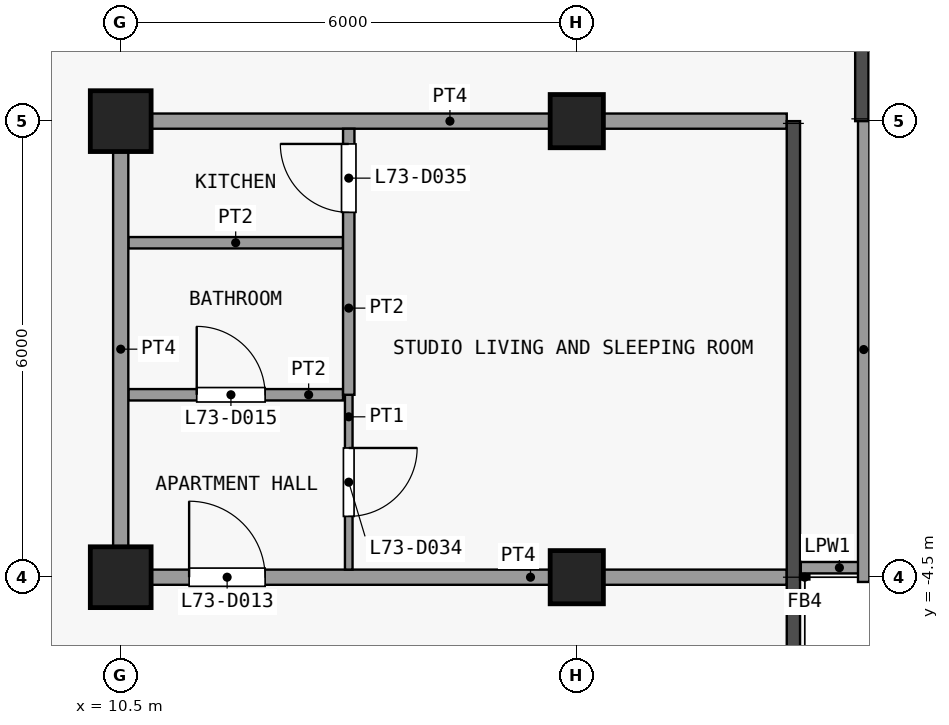
"""IFC4 building model, lengths in metres.
Left out: names, types, materials, properties, quantities, classifications, styles, units other than length and angle.
Written with IfcOpenShell. Run it as: python <this file> out.ifc"""

import sys

from ifc_helpers import new_model, si_unit, direction, frame, frame_2d, origin, origin_2d, place, context, subcontext, project, spatial, rectangle, extrude, element, fill, save


model = new_model("IFC4")
c1 = context("Model", 3, precision=1e-05, world=origin(), true_north=direction((0.0, 1.0)))
c2 = subcontext(c1, "Body", "Model", "MODEL_VIEW")
j1 = project(units=[si_unit("LENGTHUNIT", "METRE"), si_unit("PLANEANGLEUNIT", "RADIAN")], contexts=[c1])
p1 = place(None, origin())
s1 = spatial("IfcSite", under=j1, at=p1, CompositionType="ELEMENT")
p2 = place(p1, origin())
s2 = spatial("IfcBuilding", under=s1, at=p2, CompositionType="ELEMENT")
p3 = place(p2, frame((0.0, 0.0, 287.9)))
s3 = spatial("IfcBuildingStorey", under=s2, at=p3, CompositionType="ELEMENT", Elevation=287.9)
for number, where, z_axis, x_axis in (
    (1, (10.5, -4.5, 0.0), (0.0, 0.0, 1.0), (1.0, 0.0, 0.0)),
    (2, (10.5, 1.5, 0.0), (0.0, 0.0, 1.0), (1.0, 0.0, 0.0)),
):
    element("IfcColumn", number, at=place(p3, frame(where, z_axis=z_axis, x_axis=x_axis)), inside=s3, PredefinedType="COLUMN", context=c2, shape_type="SweptSolid", body=[
        extrude(rectangle(XDim=0.8, YDim=0.8, at=origin_2d()), origin(), (0.0, 0.0, 1.0), 3.6),
    ])
for number, where, z_axis, x_axis in (
    (3, (16.5, -4.5, 0.0), (0.0, 0.0, 1.0), (1.0, 0.0, 0.0)),
    (4, (16.5, 1.5, 0.0), (0.0, 0.0, 1.0), (1.0, 0.0, 0.0)),
):
    element("IfcColumn", number, at=place(p3, frame(where, z_axis=z_axis, x_axis=x_axis)), inside=s3, PredefinedType="COLUMN", context=c2, shape_type="SweptSolid", body=[
        extrude(rectangle(XDim=0.7, YDim=0.7, at=origin_2d()), origin(), (0.0, 0.0, 1.0), 3.6),
    ])
p4 = place(p3, frame((20.462, -4.375, 0.0), z_axis=(0.0, 0.0, 1.0), x_axis=(-1.0, 0.0, 0.0)))
e5 = element("IfcWall", 5, at=p4, inside=s3, PredefinedType="PARAPET", context=c2, shape_type="SweptSolid", body=[
    extrude(rectangle(XDim=1.015, YDim=0.15, at=frame_2d((0.507, 0.0))), origin(), (0.0, 0.0, 1.0), 1.15),
])
p5 = place(p3, frame((20.275, 1.552, 0.0), z_axis=(0.0, 0.0, 1.0), x_axis=(0.0, -1.0, 0.0)))
e6 = element("IfcWall", 6, at=p5, inside=s3, PredefinedType="PARAPET", context=c2, shape_type="SweptSolid", body=[
    extrude(rectangle(XDim=6.115, YDim=0.15, at=frame_2d((3.058, 0.0))), origin(), (0.0, 0.0, 1.0), 1.15),
])
p6 = place(p3, frame((10.4, -4.5, 0.0), z_axis=(0.0, 0.0, 1.0), x_axis=(1.0, 0.0, 0.0)))
e7 = element("IfcWall", 7, at=p6, inside=s3, PredefinedType="PARTITIONING", context=c2, shape_type="SweptSolid", body=[
    extrude(rectangle(XDim=8.863, YDim=0.2, at=frame_2d((4.431, 0.0))), origin(), (0.0, 0.0, 1.0), 3.3),
])
p7 = place(p6, frame((1.0, 0.0, 0.0)))
e8 = element("IfcOpeningElement", 8, at=p7, cuts=e7, PredefinedType="OPENING", context=c2, shape_type="SweptSolid", body=[
    extrude(rectangle(XDim=1.0, YDim=2.1, at=frame_2d((0.5, 1.05))), frame((0.0, 0.11, 0.0), z_axis=(0.0, -1.0, 0.0), x_axis=(1.0, 0.0, 0.0)), (0.0, 0.0, 1.0), 0.22),
])
p8 = place(p3, frame((10.6, -2.1, 0.0), z_axis=(0.0, 0.0, 1.0), x_axis=(1.0, 0.0, 0.0)))
e9 = element("IfcWall", 9, at=p8, inside=s3, PredefinedType="PARTITIONING", context=c2, shape_type="SweptSolid", body=[
    extrude(rectangle(XDim=2.825, YDim=0.15, at=frame_2d((1.413, 0.0))), origin(), (0.0, 0.0, 1.0), 3.3),
])
p9 = place(p8, frame((0.9, 0.0, 0.0)))
e10 = element("IfcOpeningElement", 10, at=p9, cuts=e9, PredefinedType="OPENING", context=c2, shape_type="SweptSolid", body=[
    extrude(rectangle(XDim=0.9, YDim=2.1, at=frame_2d((0.45, 1.05))), frame((0.0, 0.085, 0.0), z_axis=(0.0, -1.0, 0.0), x_axis=(1.0, 0.0, 0.0)), (0.0, 0.0, 1.0), 0.17),
])
p10 = place(p3, frame((10.6, -0.1, 0.0), z_axis=(0.0, 0.0, 1.0), x_axis=(1.0, 0.0, 0.0)))
e11 = element("IfcWall", 11, at=p10, inside=s3, PredefinedType="PARTITIONING", context=c2, shape_type="SweptSolid", body=[
    extrude(rectangle(XDim=2.825, YDim=0.15, at=frame_2d((1.413, 0.0))), origin(), (0.0, 0.0, 1.0), 3.3),
])
p11 = place(p3, frame((10.4, 1.5, 0.0), z_axis=(0.0, 0.0, 1.0), x_axis=(1.0, 0.0, 0.0)))
e12 = element("IfcWall", 12, at=p11, inside=s3, PredefinedType="PARTITIONING", context=c2, shape_type="SweptSolid", body=[
    extrude(rectangle(XDim=8.863, YDim=0.2, at=frame_2d((4.431, 0.0))), origin(), (0.0, 0.0, 1.0), 3.3),
])
p12 = place(p3, frame((10.5, -4.4, 0.0), z_axis=(0.0, 0.0, 1.0), x_axis=(0.0, 1.0, 0.0)))
e13 = element("IfcWall", 13, at=p12, inside=s3, PredefinedType="PARTITIONING", context=c2, shape_type="SweptSolid", body=[
    extrude(rectangle(XDim=5.8, YDim=0.2, at=frame_2d((2.9, 0.0))), origin(), (0.0, 0.0, 1.0), 3.3),
])
p13 = place(p3, frame((13.5, -4.4, 0.0), z_axis=(0.0, 0.0, 1.0), x_axis=(0.0, 1.0, 0.0)))
e14 = element("IfcWall", 14, at=p13, inside=s3, PredefinedType="PARTITIONING", context=c2, shape_type="SweptSolid", body=[
    extrude(rectangle(XDim=2.3, YDim=0.1, at=frame_2d((1.15, 0.0))), origin(), (0.0, 0.0, 1.0), 3.3),
])
p14 = place(p13, frame((0.7, 0.0, 0.0)))
e15 = element("IfcOpeningElement", 15, at=p14, cuts=e14, PredefinedType="OPENING", context=c2, shape_type="SweptSolid", body=[
    extrude(rectangle(XDim=0.9, YDim=2.1, at=frame_2d((0.45, 1.05))), frame((0.0, 0.06, 0.0), z_axis=(0.0, -1.0, 0.0), x_axis=(1.0, 0.0, 0.0)), (0.0, 0.0, 1.0), 0.12),
])
p15 = place(p3, frame((13.5, -2.1, 0.0), z_axis=(0.0, 0.0, 1.0), x_axis=(0.0, 1.0, 0.0)))
e16 = element("IfcWall", 16, at=p15, inside=s3, PredefinedType="PARTITIONING", context=c2, shape_type="SweptSolid", body=[
    extrude(rectangle(XDim=3.5, YDim=0.15, at=frame_2d((1.75, 0.0))), origin(), (0.0, 0.0, 1.0), 3.3),
])
p16 = place(p15, frame((2.4, 0.0, 0.0)))
e17 = element("IfcOpeningElement", 17, at=p16, cuts=e16, PredefinedType="OPENING", context=c2, shape_type="SweptSolid", body=[
    extrude(rectangle(XDim=0.9, YDim=2.1, at=frame_2d((0.45, 1.05))), frame((0.0, 0.085, 0.0), z_axis=(0.0, -1.0, 0.0), x_axis=(1.0, 0.0, 0.0)), (0.0, 0.0, 1.0), 0.17),
])
p17 = place(p7, origin())
e18 = element("IfcDoor", 18, at=p17, inside=s3, OperationType="SINGLE_SWING_RIGHT", PredefinedType="DOOR", context=c2, shape_type="SweptSolid", body=[
    extrude(rectangle(XDim=1.0, YDim=2.1, at=frame_2d((0.5, 1.05))), frame((0.0, 0.025, 0.0), z_axis=(0.0, -1.0, 0.0), x_axis=(1.0, 0.0, 0.0)), (0.0, 0.0, 1.0), 0.05),
])
fill(e8, e18)
p18 = place(p9, origin())
e19 = element("IfcDoor", 19, at=p18, inside=s3, OperationType="SINGLE_SWING_RIGHT", PredefinedType="DOOR", context=c2, shape_type="SweptSolid", body=[
    extrude(rectangle(XDim=0.9, YDim=2.1, at=frame_2d((0.45, 1.05))), frame((0.0, 0.025, 0.0), z_axis=(0.0, -1.0, 0.0), x_axis=(1.0, 0.0, 0.0)), (0.0, 0.0, 1.0), 0.05),
])
fill(e10, e19)
p19 = place(p14, origin())
e20 = element("IfcDoor", 20, at=p19, inside=s3, OperationType="SINGLE_SWING_RIGHT", PredefinedType="DOOR", context=c2, shape_type="SweptSolid", body=[
    extrude(rectangle(XDim=0.9, YDim=2.1, at=frame_2d((0.45, 1.05))), frame((0.0, 0.025, 0.0), z_axis=(0.0, -1.0, 0.0), x_axis=(1.0, 0.0, 0.0)), (0.0, 0.0, 1.0), 0.05),
])
fill(e15, e20)
p20 = place(p16, origin())
e21 = element("IfcDoor", 21, at=p20, inside=s3, OperationType="SINGLE_SWING_LEFT", PredefinedType="DOOR", context=c2, shape_type="SweptSolid", body=[
    extrude(rectangle(XDim=0.9, YDim=2.1, at=frame_2d((0.45, 1.05))), frame((0.0, 0.025, 0.0), z_axis=(0.0, -1.0, 0.0), x_axis=(1.0, 0.0, 0.0)), (0.0, 0.0, 1.0), 0.05),
])
fill(e17, e21)
save(model, sys.argv[1])
